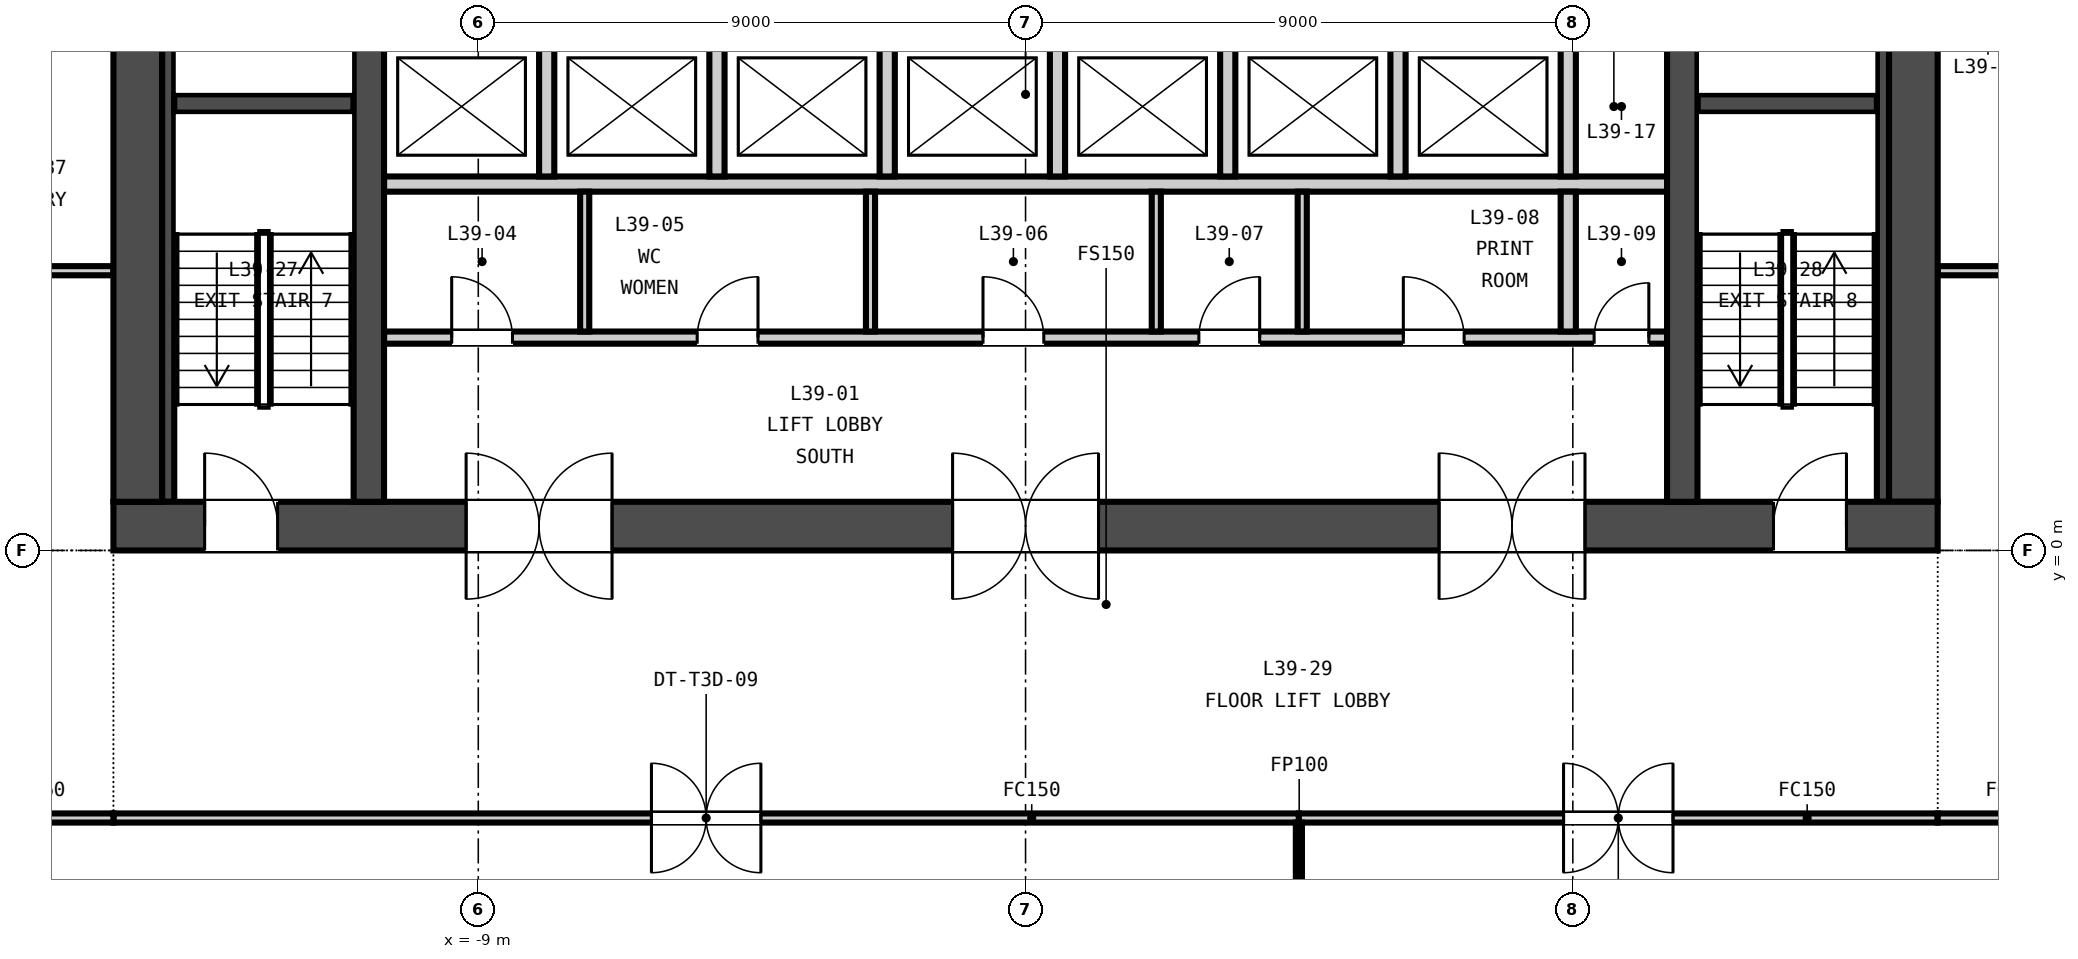
"""IFC4 building model, lengths in metres.
Left out: names, types, materials, properties, quantities, classifications, styles, units other than length and angle.
Written with IfcOpenShell. Run it as: python <this file> out.ifc"""

import sys

from ifc_helpers import new_model, si_unit, direction, frame, frame_2d, origin, place, context, subcontext, project, spatial, rectangle, extrude, element, fill, save


model = new_model("IFC4")
c1 = context("Model", 3, precision=1e-05, world=origin(), true_north=direction((0.0, 1.0)))
c2 = subcontext(c1, "Body", "Model", "MODEL_VIEW")
j1 = project(units=[si_unit("LENGTHUNIT", "METRE"), si_unit("PLANEANGLEUNIT", "RADIAN")], contexts=[c1])
p1 = place(None, origin())
s1 = spatial("IfcSite", under=j1, at=p1, CompositionType="ELEMENT")
p2 = place(p1, origin())
s2 = spatial("IfcBuilding", under=s1, at=p2, CompositionType="ELEMENT")
p3 = place(p2, frame((0.0, 0.0, 159.0)))
s3 = spatial("IfcBuildingStorey", under=s2, at=p3, CompositionType="ELEMENT", Elevation=159.0)
p4 = place(p3, frame((-15.0, 0.4, -0.15), z_axis=(0.0, 0.0, 1.0), x_axis=(1.0, 0.0, 0.0)))
e1 = element("IfcWall", 1, at=p4, inside=s3, PredefinedType="SOLIDWALL", context=c2, shape_type="SweptSolid", body=[
    extrude(rectangle(XDim=30.0, YDim=0.8, at=frame_2d((15.0, 0.0))), origin(), (0.0, 0.0, 1.0), 3.65),
])
p5 = place(p4, frame((5.8, 0.0, 0.15)))
e2 = element("IfcOpeningElement", 2, at=p5, cuts=e1, PredefinedType="OPENING", context=c2, shape_type="SweptSolid", body=[
    extrude(rectangle(XDim=2.4, YDim=2.4, at=frame_2d((1.2, 1.2))), frame((0.0, 0.41, 0.0), z_axis=(0.0, -1.0, 0.0), x_axis=(1.0, 0.0, 0.0)), (0.0, 0.0, 1.0), 0.82),
])
p6 = place(p4, frame((13.8, 0.0, 0.15)))
e3 = element("IfcOpeningElement", 3, at=p6, cuts=e1, PredefinedType="OPENING", context=c2, shape_type="SweptSolid", body=[
    extrude(rectangle(XDim=2.4, YDim=2.4, at=frame_2d((1.2, 1.2))), frame((0.0, 0.41, 0.0), z_axis=(0.0, -1.0, 0.0), x_axis=(1.0, 0.0, 0.0)), (0.0, 0.0, 1.0), 0.82),
])
p7 = place(p4, frame((21.8, 0.0, 0.15)))
e4 = element("IfcOpeningElement", 4, at=p7, cuts=e1, PredefinedType="OPENING", context=c2, shape_type="SweptSolid", body=[
    extrude(rectangle(XDim=2.4, YDim=2.4, at=frame_2d((1.2, 1.2))), frame((0.0, 0.41, 0.0), z_axis=(0.0, -1.0, 0.0), x_axis=(1.0, 0.0, 0.0)), (0.0, 0.0, 1.0), 0.82),
])
p8 = place(p4, frame((1.5, 0.0, 0.15)))
e5 = element("IfcOpeningElement", 5, at=p8, cuts=e1, PredefinedType="OPENING", context=c2, shape_type="SweptSolid", body=[
    extrude(rectangle(XDim=1.2, YDim=2.1, at=frame_2d((0.6, 1.05))), frame((0.0, 0.41, 0.0), z_axis=(0.0, -1.0, 0.0), x_axis=(1.0, 0.0, 0.0)), (0.0, 0.0, 1.0), 0.82),
])
p9 = place(p4, frame((27.3, 0.0, 0.15)))
e6 = element("IfcOpeningElement", 6, at=p9, cuts=e1, PredefinedType="OPENING", context=c2, shape_type="SweptSolid", body=[
    extrude(rectangle(XDim=1.2, YDim=2.1, at=frame_2d((0.6, 1.05))), frame((0.0, 0.41, 0.0), z_axis=(0.0, -1.0, 0.0), x_axis=(1.0, 0.0, 0.0)), (0.0, 0.0, 1.0), 0.82),
])
for number, where, z_axis, x_axis in (
    (7, (-14.6, 0.8, -0.15), (0.0, 0.0, 1.0), (0.0, 1.0, 0.0)),
    (8, (14.6, 0.8, -0.15), (0.0, 0.0, 1.0), (0.0, 1.0, 0.0)),
):
    element("IfcWall", number, at=place(p3, frame(where, z_axis=z_axis, x_axis=x_axis)), inside=s3, PredefinedType="SOLIDWALL", context=c2, shape_type="SweptSolid", body=[
        extrude(rectangle(XDim=13.4, YDim=0.8, at=frame_2d((6.7, 0.0))), origin(), (0.0, 0.0, 1.0), 3.65),
    ])
for number, where, z_axis, x_axis in (
    (9, (-10.8, 0.8, -0.15), (0.0, 0.0, 1.0), (0.0, 1.0, 0.0)),
    (10, (10.8, 0.8, -0.15), (0.0, 0.0, 1.0), (0.0, 1.0, 0.0)),
):
    element("IfcWall", number, at=place(p3, frame(where, z_axis=z_axis, x_axis=x_axis)), inside=s3, PredefinedType="SOLIDWALL", context=c2, shape_type="SweptSolid", body=[
        extrude(rectangle(XDim=13.4, YDim=0.5, at=frame_2d((6.7, 0.0))), origin(), (0.0, 0.0, 1.0), 3.65),
    ])
p10 = place(p3, frame((-10.55, 3.5, 0.0), z_axis=(0.0, 0.0, 1.0), x_axis=(1.0, 0.0, 0.0)))
e11 = element("IfcWall", 11, at=p10, inside=s3, PredefinedType="PARTITIONING", context=c2, shape_type="SweptSolid", body=[
    extrude(rectangle(XDim=21.1, YDim=0.2, at=frame_2d((10.55, 0.0))), origin(), (0.0, 0.0, 1.0), 3.5),
])
p11 = place(p10, frame((1.113, 0.0, 0.0)))
e12 = element("IfcOpeningElement", 12, at=p11, cuts=e11, PredefinedType="OPENING", context=c2, shape_type="SweptSolid", body=[
    extrude(rectangle(XDim=1.0, YDim=2.1, at=frame_2d((0.5, 1.05))), frame((0.0, 0.11, 0.0), z_axis=(0.0, -1.0, 0.0), x_axis=(1.0, 0.0, 0.0)), (0.0, 0.0, 1.0), 0.22),
])
p12 = place(p10, frame((5.15, 0.0, 0.0)))
e13 = element("IfcOpeningElement", 13, at=p12, cuts=e11, PredefinedType="OPENING", context=c2, shape_type="SweptSolid", body=[
    extrude(rectangle(XDim=1.0, YDim=2.1, at=frame_2d((0.5, 1.05))), frame((0.0, 0.11, 0.0), z_axis=(0.0, -1.0, 0.0), x_axis=(1.0, 0.0, 0.0)), (0.0, 0.0, 1.0), 0.22),
])
p13 = place(p10, frame((9.85, 0.0, 0.0)))
e14 = element("IfcOpeningElement", 14, at=p13, cuts=e11, PredefinedType="OPENING", context=c2, shape_type="SweptSolid", body=[
    extrude(rectangle(XDim=1.0, YDim=2.1, at=frame_2d((0.5, 1.05))), frame((0.0, 0.11, 0.0), z_axis=(0.0, -1.0, 0.0), x_axis=(1.0, 0.0, 0.0)), (0.0, 0.0, 1.0), 0.22),
])
p14 = place(p10, frame((13.4, 0.0, 0.0)))
e15 = element("IfcOpeningElement", 15, at=p14, cuts=e11, PredefinedType="OPENING", context=c2, shape_type="SweptSolid", body=[
    extrude(rectangle(XDim=1.0, YDim=2.1, at=frame_2d((0.5, 1.05))), frame((0.0, 0.11, 0.0), z_axis=(0.0, -1.0, 0.0), x_axis=(1.0, 0.0, 0.0)), (0.0, 0.0, 1.0), 0.22),
])
p15 = place(p10, frame((16.762, 0.0, 0.0)))
e16 = element("IfcOpeningElement", 16, at=p15, cuts=e11, PredefinedType="OPENING", context=c2, shape_type="SweptSolid", body=[
    extrude(rectangle(XDim=1.0, YDim=2.1, at=frame_2d((0.5, 1.05))), frame((0.0, 0.11, 0.0), z_axis=(0.0, -1.0, 0.0), x_axis=(1.0, 0.0, 0.0)), (0.0, 0.0, 1.0), 0.22),
])
p16 = place(p10, frame((19.9, 0.0, 0.0)))
e17 = element("IfcOpeningElement", 17, at=p16, cuts=e11, PredefinedType="OPENING", context=c2, shape_type="SweptSolid", body=[
    extrude(rectangle(XDim=0.9, YDim=2.1, at=frame_2d((0.45, 1.05))), frame((0.0, 0.11, 0.0), z_axis=(0.0, -1.0, 0.0), x_axis=(1.0, 0.0, 0.0)), (0.0, 0.0, 1.0), 0.22),
])
p17 = place(p3, frame((-10.55, 6.025, 0.0), z_axis=(0.0, 0.0, 1.0), x_axis=(1.0, 0.0, 0.0)))
e18 = element("IfcWall", 18, at=p17, inside=s3, PredefinedType="PARTITIONING", context=c2, shape_type="SweptSolid", body=[
    extrude(rectangle(XDim=21.1, YDim=0.25, at=frame_2d((10.55, 0.0))), origin(), (0.0, 0.0, 1.0), 3.5),
])
for number, where, z_axis, x_axis in (
    (19, (-7.25, 3.6, 0.0), (0.0, 0.0, 1.0), (0.0, 1.0, 0.0)),
    (20, (-2.55, 3.6, 0.0), (0.0, 0.0, 1.0), (0.0, 1.0, 0.0)),
    (21, (2.15, 3.6, 0.0), (0.0, 0.0, 1.0), (0.0, 1.0, 0.0)),
    (22, (4.55, 3.6, 0.0), (0.0, 0.0, 1.0), (0.0, 1.0, 0.0)),
):
    element("IfcWall", number, at=place(p3, frame(where, z_axis=z_axis, x_axis=x_axis)), inside=s3, PredefinedType="PARTITIONING", context=c2, shape_type="SweptSolid", body=[
        extrude(rectangle(XDim=2.3, YDim=0.15, at=frame_2d((1.15, 0.0))), origin(), (0.0, 0.0, 1.0), 3.5),
    ])
p18 = place(p3, frame((8.925, 3.6, 0.0), z_axis=(0.0, 0.0, 1.0), x_axis=(0.0, 1.0, 0.0)))
e23 = element("IfcWall", 23, at=p18, inside=s3, PredefinedType="PARTITIONING", context=c2, shape_type="SweptSolid", body=[
    extrude(rectangle(XDim=2.3, YDim=0.25, at=frame_2d((1.15, 0.0))), origin(), (0.0, 0.0, 1.0), 3.5),
])
for number, where, z_axis, x_axis in (
    (24, (-7.875, 6.15, 0.0), (0.0, 0.0, 1.0), (0.0, 1.0, 0.0)),
    (25, (-5.075, 6.15, 0.0), (0.0, 0.0, 1.0), (0.0, 1.0, 0.0)),
    (26, (-2.275, 6.15, 0.0), (0.0, 0.0, 1.0), (0.0, 1.0, 0.0)),
    (27, (0.525, 6.15, 0.0), (0.0, 0.0, 1.0), (0.0, 1.0, 0.0)),
    (28, (3.325, 6.15, 0.0), (0.0, 0.0, 1.0), (0.0, 1.0, 0.0)),
    (29, (6.125, 6.15, 0.0), (0.0, 0.0, 1.0), (0.0, 1.0, 0.0)),
    (30, (8.925, 6.15, 0.0), (0.0, 0.0, 1.0), (0.0, 1.0, 0.0)),
):
    element("IfcWall", number, at=place(p3, frame(where, z_axis=z_axis, x_axis=x_axis)), inside=s3, PredefinedType="PARTITIONING", context=c2, shape_type="SweptSolid", body=[
        extrude(rectangle(XDim=2.3, YDim=0.25, at=frame_2d((1.15, 0.0))), origin(), (0.0, 0.0, 1.0), 3.5),
    ])
p19 = place(p3, frame((-14.0, 7.35, 0.0), z_axis=(0.0, 0.0, 1.0), x_axis=(1.0, 0.0, 0.0)))
e31 = element("IfcWall", 31, at=p19, inside=s3, PredefinedType="SOLIDWALL", context=c2, shape_type="SweptSolid", body=[
    extrude(rectangle(XDim=2.95, YDim=0.3, at=frame_2d((1.475, 0.0))), origin(), (0.0, 0.0, 1.0), 3.5),
])
p20 = place(p3, frame((-14.1, 0.8, 0.0), z_axis=(0.0, 0.0, 1.0), x_axis=(0.0, 1.0, 0.0)))
e32 = element("IfcWall", 32, at=p20, inside=s3, PredefinedType="SOLIDWALL", context=c2, shape_type="SweptSolid", body=[
    extrude(rectangle(XDim=13.4, YDim=0.2, at=frame_2d((6.7, 0.0))), origin(), (0.0, 0.0, 1.0), 3.5),
])
p21 = place(p3, frame((11.05, 7.35, 0.0), z_axis=(0.0, 0.0, 1.0), x_axis=(1.0, 0.0, 0.0)))
e33 = element("IfcWall", 33, at=p21, inside=s3, PredefinedType="SOLIDWALL", context=c2, shape_type="SweptSolid", body=[
    extrude(rectangle(XDim=2.95, YDim=0.3, at=frame_2d((1.475, 0.0))), origin(), (0.0, 0.0, 1.0), 3.5),
])
p22 = place(p3, frame((14.1, 0.8, 0.0), z_axis=(0.0, 0.0, 1.0), x_axis=(0.0, 1.0, 0.0)))
e34 = element("IfcWall", 34, at=p22, inside=s3, PredefinedType="SOLIDWALL", context=c2, shape_type="SweptSolid", body=[
    extrude(rectangle(XDim=13.4, YDim=0.2, at=frame_2d((6.7, 0.0))), origin(), (0.0, 0.0, 1.0), 3.5),
])
p23 = place(p3, frame((4.495, -4.4, 0.0), z_axis=(0.0, 0.0, 1.0), x_axis=(-1.0, 0.0, 0.0)))
e35 = element("IfcWall", 35, at=p23, inside=s3, PredefinedType="PARTITIONING", context=c2, shape_type="SweptSolid", body=[
    extrude(rectangle(XDim=19.495, YDim=0.15, at=frame_2d((9.748, 0.0))), origin(), (0.0, 0.0, 1.0), 2.741),
])
p24 = place(p23, frame((8.847, 0.0, 0.0)))
e36 = element("IfcOpeningElement", 36, at=p24, cuts=e35, PredefinedType="OPENING", context=c2, shape_type="SweptSolid", body=[
    extrude(rectangle(XDim=1.8, YDim=2.1, at=frame_2d((0.9, 1.05))), frame((0.0, 0.085, 0.0), z_axis=(0.0, -1.0, 0.0), x_axis=(1.0, 0.0, 0.0)), (0.0, 0.0, 1.0), 0.17),
])
p25 = place(p3, frame((15.0, -4.4, 0.0), z_axis=(0.0, 0.0, 1.0), x_axis=(-1.0, 0.0, 0.0)))
e37 = element("IfcWall", 37, at=p25, inside=s3, PredefinedType="PARTITIONING", context=c2, shape_type="SweptSolid", body=[
    extrude(rectangle(XDim=10.505, YDim=0.15, at=frame_2d((5.252, 0.0))), origin(), (0.0, 0.0, 1.0), 2.741),
])
p26 = place(p25, frame((4.353, 0.0, 0.0)))
e38 = element("IfcOpeningElement", 38, at=p26, cuts=e37, PredefinedType="OPENING", context=c2, shape_type="SweptSolid", body=[
    extrude(rectangle(XDim=1.8, YDim=2.1, at=frame_2d((0.9, 1.05))), frame((0.0, 0.085, 0.0), z_axis=(0.0, -1.0, 0.0), x_axis=(1.0, 0.0, 0.0)), (0.0, 0.0, 1.0), 0.17),
])
p27 = place(p3, frame((21.925, -4.4, 0.0), z_axis=(0.0, 0.0, 1.0), x_axis=(-1.0, 0.0, 0.0)))
e39 = element("IfcWall", 39, at=p27, inside=s3, PredefinedType="PARTITIONING", context=c2, shape_type="SweptSolid", body=[
    extrude(rectangle(XDim=6.925, YDim=0.15, at=frame_2d((3.462, 0.0))), origin(), (0.0, 0.0, 1.0), 2.741),
])
p28 = place(p27, frame((2.562, 0.0, 0.0)))
e40 = element("IfcOpeningElement", 40, at=p28, cuts=e39, PredefinedType="OPENING", context=c2, shape_type="SweptSolid", body=[
    extrude(rectangle(XDim=1.8, YDim=2.1, at=frame_2d((0.9, 1.05))), frame((0.0, 0.085, 0.0), z_axis=(0.0, -1.0, 0.0), x_axis=(1.0, 0.0, 0.0)), (0.0, 0.0, 1.0), 0.17),
])
p29 = place(p3, frame((-15.0, -4.4, 0.0), z_axis=(0.0, 0.0, 1.0), x_axis=(-1.0, 0.0, 0.0)))
e41 = element("IfcWall", 41, at=p29, inside=s3, PredefinedType="PARTITIONING", context=c2, shape_type="SweptSolid", body=[
    extrude(rectangle(XDim=7.0, YDim=0.15, at=frame_2d((3.5, 0.0))), origin(), (0.0, 0.0, 1.0), 2.741),
])
p30 = place(p29, frame((2.6, 0.0, 0.0)))
e42 = element("IfcOpeningElement", 42, at=p30, cuts=e41, PredefinedType="OPENING", context=c2, shape_type="SweptSolid", body=[
    extrude(rectangle(XDim=1.8, YDim=2.1, at=frame_2d((0.9, 1.05))), frame((0.0, 0.085, 0.0), z_axis=(0.0, -1.0, 0.0), x_axis=(1.0, 0.0, 0.0)), (0.0, 0.0, 1.0), 0.17),
])
p31 = place(p3, frame((-15.0, 13.531, 0.0), z_axis=(0.0, 0.0, 1.0), x_axis=(-0.347347751601, -0.937736391241, 0.0)))
e43 = element("IfcWall", 43, at=p31, inside=s3, PredefinedType="PARTITIONING", context=c2, shape_type="SweptSolid", body=[
    extrude(rectangle(XDim=9.524, YDim=0.15, at=frame_2d((4.762, 0.0))), origin(), (0.0, 0.0, 1.0), 2.741),
])
p32 = place(p31, frame((4.262, 0.0, 0.0)))
e44 = element("IfcOpeningElement", 44, at=p32, cuts=e43, PredefinedType="OPENING", context=c2, shape_type="SweptSolid", body=[
    extrude(rectangle(XDim=1.0, YDim=2.1, at=frame_2d((0.5, 1.05))), frame((0.0, 0.085, 0.0), z_axis=(0.0, -1.0, 0.0), x_axis=(1.0, 0.0, 0.0)), (0.0, 0.0, 1.0), 0.17),
])
p33 = place(p3, frame((18.308, 4.6, 0.0), z_axis=(0.0, 0.0, 1.0), x_axis=(-0.347347751601, 0.937736391241, 0.0)))
e45 = element("IfcWall", 45, at=p33, inside=s3, PredefinedType="PARTITIONING", context=c2, shape_type="SweptSolid", body=[
    extrude(rectangle(XDim=9.524, YDim=0.15, at=frame_2d((4.762, 0.0))), origin(), (0.0, 0.0, 1.0), 2.741),
])
p34 = place(p33, frame((4.262, 0.0, 0.0)))
e46 = element("IfcOpeningElement", 46, at=p34, cuts=e45, PredefinedType="OPENING", context=c2, shape_type="SweptSolid", body=[
    extrude(rectangle(XDim=1.0, YDim=2.1, at=frame_2d((0.5, 1.05))), frame((0.0, 0.085, 0.0), z_axis=(0.0, -1.0, 0.0), x_axis=(1.0, 0.0, 0.0)), (0.0, 0.0, 1.0), 0.17),
])
for number, where, z_axis, x_axis in (
    (47, (-18.228, 4.6, 0.0), (0.0, 0.0, 1.0), (1.0, 0.0, 0.0)),
    (48, (15.0, 4.6, 0.0), (0.0, 0.0, 1.0), (1.0, 0.0, 0.0)),
):
    element("IfcWall", number, at=place(p3, frame(where, z_axis=z_axis, x_axis=x_axis)), inside=s3, PredefinedType="PARTITIONING", context=c2, shape_type="SweptSolid", body=[
        extrude(rectangle(XDim=3.228, YDim=0.15, at=frame_2d((1.614, 0.0))), origin(), (0.0, 0.0, 1.0), 2.741),
    ])
p35 = place(p3, frame((4.495, -8.85, 0.0), z_axis=(0.0, 0.0, 1.0), x_axis=(0.0, 1.0, 0.0)))
e49 = element("IfcWall", 49, at=p35, inside=s3, PredefinedType="PARTITIONING", context=c2, shape_type="SweptSolid", body=[
    extrude(rectangle(XDim=4.375, YDim=0.1, at=frame_2d((2.188, 0.0))), origin(), (0.0, 0.0, 1.0), 2.741),
])
p36 = place(p11, origin())
e50 = element("IfcDoor", 50, at=p36, inside=s3, OperationType="SINGLE_SWING_LEFT", PredefinedType="DOOR", context=c2, shape_type="SweptSolid", body=[
    extrude(rectangle(XDim=1.0, YDim=2.1, at=frame_2d((0.5, 1.05))), frame((0.0, 0.025, 0.0), z_axis=(0.0, -1.0, 0.0), x_axis=(1.0, 0.0, 0.0)), (0.0, 0.0, 1.0), 0.05),
])
fill(e12, e50)
p37 = place(p12, origin())
e51 = element("IfcDoor", 51, at=p37, inside=s3, OperationType="SINGLE_SWING_RIGHT", PredefinedType="DOOR", context=c2, shape_type="SweptSolid", body=[
    extrude(rectangle(XDim=1.0, YDim=2.1, at=frame_2d((0.5, 1.05))), frame((0.0, 0.025, 0.0), z_axis=(0.0, -1.0, 0.0), x_axis=(1.0, 0.0, 0.0)), (0.0, 0.0, 1.0), 0.05),
])
fill(e13, e51)
p38 = place(p13, origin())
e52 = element("IfcDoor", 52, at=p38, inside=s3, OperationType="SINGLE_SWING_LEFT", PredefinedType="DOOR", context=c2, shape_type="SweptSolid", body=[
    extrude(rectangle(XDim=1.0, YDim=2.1, at=frame_2d((0.5, 1.05))), frame((0.0, 0.025, 0.0), z_axis=(0.0, -1.0, 0.0), x_axis=(1.0, 0.0, 0.0)), (0.0, 0.0, 1.0), 0.05),
])
fill(e14, e52)
p39 = place(p14, origin())
e53 = element("IfcDoor", 53, at=p39, inside=s3, OperationType="SINGLE_SWING_RIGHT", PredefinedType="DOOR", context=c2, shape_type="SweptSolid", body=[
    extrude(rectangle(XDim=1.0, YDim=2.1, at=frame_2d((0.5, 1.05))), frame((0.0, 0.025, 0.0), z_axis=(0.0, -1.0, 0.0), x_axis=(1.0, 0.0, 0.0)), (0.0, 0.0, 1.0), 0.05),
])
fill(e15, e53)
p40 = place(p15, origin())
e54 = element("IfcDoor", 54, at=p40, inside=s3, OperationType="SINGLE_SWING_LEFT", PredefinedType="DOOR", context=c2, shape_type="SweptSolid", body=[
    extrude(rectangle(XDim=1.0, YDim=2.1, at=frame_2d((0.5, 1.05))), frame((0.0, 0.025, 0.0), z_axis=(0.0, -1.0, 0.0), x_axis=(1.0, 0.0, 0.0)), (0.0, 0.0, 1.0), 0.05),
])
fill(e16, e54)
p41 = place(p16, origin())
e55 = element("IfcDoor", 55, at=p41, inside=s3, OperationType="SINGLE_SWING_RIGHT", PredefinedType="DOOR", context=c2, shape_type="SweptSolid", body=[
    extrude(rectangle(XDim=0.9, YDim=2.1, at=frame_2d((0.45, 1.05))), frame((0.0, 0.025, 0.0), z_axis=(0.0, -1.0, 0.0), x_axis=(1.0, 0.0, 0.0)), (0.0, 0.0, 1.0), 0.05),
])
fill(e17, e55)
p42 = place(p5, origin())
e56 = element("IfcDoor", 56, at=p42, inside=s3, OperationType="DOUBLE_DOOR_DOUBLE_SWING", PredefinedType="DOOR", context=c2, shape_type="SweptSolid", body=[
    extrude(rectangle(XDim=2.4, YDim=2.4, at=frame_2d((1.2, 1.2))), frame((0.0, 0.025, 0.0), z_axis=(0.0, -1.0, 0.0), x_axis=(1.0, 0.0, 0.0)), (0.0, 0.0, 1.0), 0.05),
])
fill(e2, e56)
p43 = place(p6, origin())
e57 = element("IfcDoor", 57, at=p43, inside=s3, OperationType="DOUBLE_DOOR_DOUBLE_SWING", PredefinedType="DOOR", context=c2, shape_type="SweptSolid", body=[
    extrude(rectangle(XDim=2.4, YDim=2.4, at=frame_2d((1.2, 1.2))), frame((0.0, 0.025, 0.0), z_axis=(0.0, -1.0, 0.0), x_axis=(1.0, 0.0, 0.0)), (0.0, 0.0, 1.0), 0.05),
])
fill(e3, e57)
p44 = place(p7, origin())
e58 = element("IfcDoor", 58, at=p44, inside=s3, OperationType="DOUBLE_DOOR_DOUBLE_SWING", PredefinedType="DOOR", context=c2, shape_type="SweptSolid", body=[
    extrude(rectangle(XDim=2.4, YDim=2.4, at=frame_2d((1.2, 1.2))), frame((0.0, 0.025, 0.0), z_axis=(0.0, -1.0, 0.0), x_axis=(1.0, 0.0, 0.0)), (0.0, 0.0, 1.0), 0.05),
])
fill(e4, e58)
p45 = place(p8, origin())
e59 = element("IfcDoor", 59, at=p45, inside=s3, OperationType="SINGLE_SWING_LEFT", PredefinedType="DOOR", context=c2, shape_type="SweptSolid", body=[
    extrude(rectangle(XDim=1.2, YDim=2.1, at=frame_2d((0.6, 1.05))), frame((0.0, 0.025, 0.0), z_axis=(0.0, -1.0, 0.0), x_axis=(1.0, 0.0, 0.0)), (0.0, 0.0, 1.0), 0.05),
])
fill(e5, e59)
p46 = place(p9, origin())
e60 = element("IfcDoor", 60, at=p46, inside=s3, OperationType="SINGLE_SWING_RIGHT", PredefinedType="DOOR", context=c2, shape_type="SweptSolid", body=[
    extrude(rectangle(XDim=1.2, YDim=2.1, at=frame_2d((0.6, 1.05))), frame((0.0, 0.025, 0.0), z_axis=(0.0, -1.0, 0.0), x_axis=(1.0, 0.0, 0.0)), (0.0, 0.0, 1.0), 0.05),
])
fill(e6, e60)
p47 = place(p24, origin())
e61 = element("IfcDoor", 61, at=p47, inside=s3, OperationType="DOUBLE_DOOR_DOUBLE_SWING", PredefinedType="DOOR", context=c2, shape_type="SweptSolid", body=[
    extrude(rectangle(XDim=1.8, YDim=2.1, at=frame_2d((0.9, 1.05))), frame((0.0, 0.025, 0.0), z_axis=(0.0, -1.0, 0.0), x_axis=(1.0, 0.0, 0.0)), (0.0, 0.0, 1.0), 0.05),
])
fill(e36, e61)
p48 = place(p26, origin())
e62 = element("IfcDoor", 62, at=p48, inside=s3, OperationType="DOUBLE_DOOR_DOUBLE_SWING", PredefinedType="DOOR", context=c2, shape_type="SweptSolid", body=[
    extrude(rectangle(XDim=1.8, YDim=2.1, at=frame_2d((0.9, 1.05))), frame((0.0, 0.025, 0.0), z_axis=(0.0, -1.0, 0.0), x_axis=(1.0, 0.0, 0.0)), (0.0, 0.0, 1.0), 0.05),
])
fill(e38, e62)
save(model, sys.argv[1])
